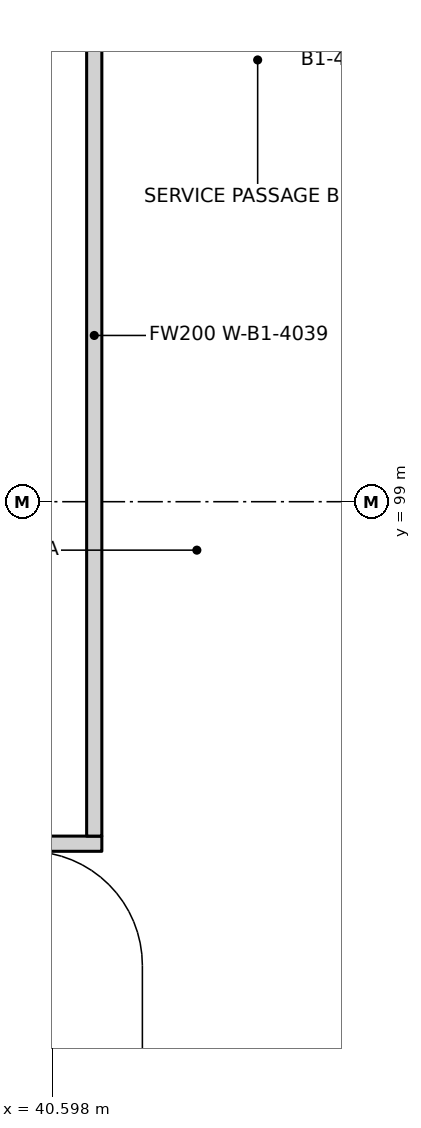
"""IFC4 building model, lengths in metres.
Left out: names, types, materials, properties, quantities, classifications, styles, units other than length and angle.
Written with IfcOpenShell. Run it as: python <this file> out.ifc"""

import sys

from ifc_helpers import new_model, si_unit, direction, frame, frame_2d, origin, place, context, subcontext, project, spatial, rectangle, extrude, element, save


model = new_model("IFC4")
c1 = context("Model", 3, precision=1e-05, world=origin(), true_north=direction((0.0, 1.0)))
c2 = subcontext(c1, "Body", "Model", "MODEL_VIEW")
j1 = project(units=[si_unit("LENGTHUNIT", "METRE"), si_unit("PLANEANGLEUNIT", "RADIAN")], contexts=[c1])
p1 = place(None, origin())
s1 = spatial("IfcSite", under=j1, at=p1, CompositionType="ELEMENT")
p2 = place(p1, origin())
s2 = spatial("IfcBuilding", under=s1, at=p2, CompositionType="ELEMENT")
p3 = place(p2, frame((0.0, 0.0, -5.1)))
s3 = spatial("IfcBuildingStorey", under=s2, at=p3, CompositionType="ELEMENT", Elevation=-5.1)
p4 = place(p3, frame((9.45, 94.5, 0.0), z_axis=(0.0, 0.0, 1.0), x_axis=(1.0, 0.0, 0.0)))
e1 = element("IfcWall", 1, at=p4, inside=s3, PredefinedType="PARTITIONING", context=c2, shape_type="SweptSolid", body=[
    extrude(rectangle(XDim=31.8, YDim=0.2, at=frame_2d((15.9, 0.0))), origin(), (0.0, 0.0, 1.0), 4.75),
])
p5 = place(p4, frame((5.7, 0.0, 0.0)))
e2 = element("IfcOpeningElement", 2, at=p5, cuts=e1, PredefinedType="OPENING", context=c2, shape_type="SweptSolid", body=[
    extrude(rectangle(XDim=1.8, YDim=2.4, at=frame_2d((0.9, 1.2))), frame((0.0, 0.11, 0.0), z_axis=(0.0, -1.0, 0.0), x_axis=(1.0, 0.0, 0.0)), (0.0, 0.0, 1.0), 0.22),
])
p6 = place(p4, frame((28.1, 0.0, 0.0)))
e3 = element("IfcOpeningElement", 3, at=p6, cuts=e1, PredefinedType="OPENING", context=c2, shape_type="SweptSolid", body=[
    extrude(rectangle(XDim=1.8, YDim=2.4, at=frame_2d((0.9, 1.2))), frame((0.0, 0.11, 0.0), z_axis=(0.0, -1.0, 0.0), x_axis=(1.0, 0.0, 0.0)), (0.0, 0.0, 1.0), 0.22),
])
p7 = place(p3, frame((41.15, 94.6, 0.0), z_axis=(0.0, 0.0, 1.0), x_axis=(0.0, 1.0, 0.0)))
e4 = element("IfcWall", 4, at=p7, inside=s3, PredefinedType="PARTITIONING", context=c2, shape_type="SweptSolid", body=[
    extrude(rectangle(XDim=13.175, YDim=0.2, at=frame_2d((6.587, 0.0))), origin(), (0.0, 0.0, 1.0), 4.75),
])
save(model, sys.argv[1])
